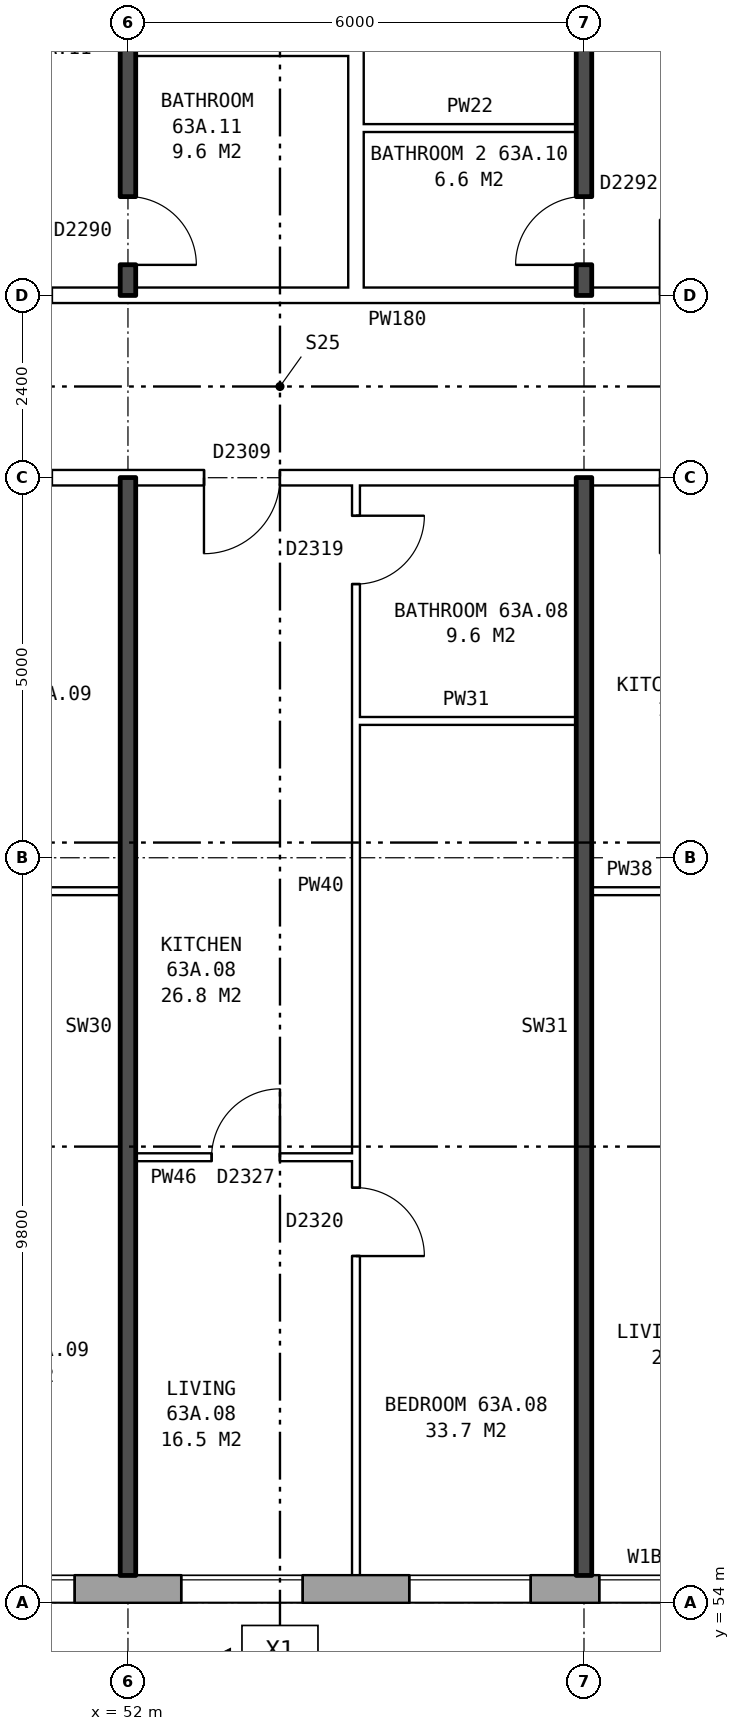
"""IFC4 building model, lengths in metres.
Left out: names, types, materials, properties, quantities, classifications, styles, units other than length and angle.
Written with IfcOpenShell. Run it as: python <this file> out.ifc"""

import sys

from ifc_helpers import new_model, si_unit, direction, frame, frame_2d, origin, place, context, subcontext, project, spatial, rectangle, extrude, element, fill, save


model = new_model("IFC4")
c1 = context("Model", 3, precision=1e-05, world=origin(), true_north=direction((0.0, 1.0)))
c2 = subcontext(c1, "Body", "Model", "MODEL_VIEW")
j1 = project(units=[si_unit("LENGTHUNIT", "METRE"), si_unit("PLANEANGLEUNIT", "RADIAN")], contexts=[c1])
p1 = place(None, origin())
s1 = spatial("IfcSite", under=j1, at=p1, CompositionType="ELEMENT")
p2 = place(p1, origin())
s2 = spatial("IfcBuilding", under=s1, at=p2, CompositionType="ELEMENT")
p3 = place(p2, frame((0.0, 0.0, 224.5)))
s3 = spatial("IfcBuildingStorey", under=s2, at=p3, CompositionType="ELEMENT", Elevation=224.5)
p4 = place(p3, frame((35.075, 54.18, 0.0), z_axis=(0.0, 0.0, 1.0), x_axis=(1.0, 0.0, 0.0)))
e1 = element("IfcWall", 1, at=p4, inside=s3, PredefinedType="STANDARD", context=c2, shape_type="SweptSolid", body=[
    extrude(rectangle(XDim=39.875, YDim=0.36, at=frame_2d((19.938, 0.0))), origin(), (0.0, 0.0, 1.0), 2.85),
])
p5 = place(p4, frame((2.625, 0.0, 0.8)))
e2 = element("IfcOpeningElement", 2, at=p5, cuts=e1, PredefinedType="OPENING", context=c2, shape_type="SweptSolid", body=[
    extrude(rectangle(XDim=1.6, YDim=1.8, at=frame_2d((0.8, 0.9))), frame((0.0, 0.19, 0.0), z_axis=(0.0, -1.0, 0.0), x_axis=(1.0, 0.0, 0.0)), (0.0, 0.0, 1.0), 0.38),
])
p6 = place(p4, frame((5.625, 0.0, 0.8)))
e3 = element("IfcOpeningElement", 3, at=p6, cuts=e1, PredefinedType="OPENING", context=c2, shape_type="SweptSolid", body=[
    extrude(rectangle(XDim=1.6, YDim=1.8, at=frame_2d((0.8, 0.9))), frame((0.0, 0.19, 0.0), z_axis=(0.0, -1.0, 0.0), x_axis=(1.0, 0.0, 0.0)), (0.0, 0.0, 1.0), 0.38),
])
p7 = place(p4, frame((8.625, 0.0, 0.8)))
e4 = element("IfcOpeningElement", 4, at=p7, cuts=e1, PredefinedType="OPENING", context=c2, shape_type="SweptSolid", body=[
    extrude(rectangle(XDim=1.6, YDim=1.8, at=frame_2d((0.8, 0.9))), frame((0.0, 0.19, 0.0), z_axis=(0.0, -1.0, 0.0), x_axis=(1.0, 0.0, 0.0)), (0.0, 0.0, 1.0), 0.38),
])
p8 = place(p4, frame((11.125, 0.0, 1.65)))
e5 = element("IfcOpeningElement", 5, at=p8, cuts=e1, PredefinedType="OPENING", context=c2, shape_type="SweptSolid", body=[
    extrude(rectangle(XDim=0.6, YDim=0.9, at=frame_2d((0.3, 0.45))), frame((0.0, 0.19, 0.0), z_axis=(0.0, -1.0, 0.0), x_axis=(1.0, 0.0, 0.0)), (0.0, 0.0, 1.0), 0.38),
])
p9 = place(p4, frame((14.625, 0.0, 0.8)))
e6 = element("IfcOpeningElement", 6, at=p9, cuts=e1, PredefinedType="OPENING", context=c2, shape_type="SweptSolid", body=[
    extrude(rectangle(XDim=1.6, YDim=1.8, at=frame_2d((0.8, 0.9))), frame((0.0, 0.19, 0.0), z_axis=(0.0, -1.0, 0.0), x_axis=(1.0, 0.0, 0.0)), (0.0, 0.0, 1.0), 0.38),
])
p10 = place(p4, frame((17.625, 0.0, 0.8)))
e7 = element("IfcOpeningElement", 7, at=p10, cuts=e1, PredefinedType="OPENING", context=c2, shape_type="SweptSolid", body=[
    extrude(rectangle(XDim=1.6, YDim=1.8, at=frame_2d((0.8, 0.9))), frame((0.0, 0.19, 0.0), z_axis=(0.0, -1.0, 0.0), x_axis=(1.0, 0.0, 0.0)), (0.0, 0.0, 1.0), 0.38),
])
p11 = place(p4, frame((20.625, 0.0, 0.8)))
e8 = element("IfcOpeningElement", 8, at=p11, cuts=e1, PredefinedType="OPENING", context=c2, shape_type="SweptSolid", body=[
    extrude(rectangle(XDim=1.6, YDim=1.8, at=frame_2d((0.8, 0.9))), frame((0.0, 0.19, 0.0), z_axis=(0.0, -1.0, 0.0), x_axis=(1.0, 0.0, 0.0)), (0.0, 0.0, 1.0), 0.38),
])
p12 = place(p4, frame((23.125, 0.0, 0.75)))
e9 = element("IfcOpeningElement", 9, at=p12, cuts=e1, PredefinedType="OPENING", context=c2, shape_type="SweptSolid", body=[
    extrude(rectangle(XDim=1.2, YDim=1.8, at=frame_2d((0.6, 0.9))), frame((0.0, 0.19, 0.0), z_axis=(0.0, -1.0, 0.0), x_axis=(1.0, 0.0, 0.0)), (0.0, 0.0, 1.0), 0.38),
])
p13 = place(p4, frame((26.625, 0.0, 0.8)))
e10 = element("IfcOpeningElement", 10, at=p13, cuts=e1, PredefinedType="OPENING", context=c2, shape_type="SweptSolid", body=[
    extrude(rectangle(XDim=1.6, YDim=1.8, at=frame_2d((0.8, 0.9))), frame((0.0, 0.19, 0.0), z_axis=(0.0, -1.0, 0.0), x_axis=(1.0, 0.0, 0.0)), (0.0, 0.0, 1.0), 0.38),
])
p14 = place(p4, frame((29.625, 0.0, 0.8)))
e11 = element("IfcOpeningElement", 11, at=p14, cuts=e1, PredefinedType="OPENING", context=c2, shape_type="SweptSolid", body=[
    extrude(rectangle(XDim=1.6, YDim=1.8, at=frame_2d((0.8, 0.9))), frame((0.0, 0.19, 0.0), z_axis=(0.0, -1.0, 0.0), x_axis=(1.0, 0.0, 0.0)), (0.0, 0.0, 1.0), 0.38),
])
p15 = place(p4, frame((32.625, 0.0, 0.8)))
e12 = element("IfcOpeningElement", 12, at=p15, cuts=e1, PredefinedType="OPENING", context=c2, shape_type="SweptSolid", body=[
    extrude(rectangle(XDim=1.6, YDim=1.8, at=frame_2d((0.8, 0.9))), frame((0.0, 0.19, 0.0), z_axis=(0.0, -1.0, 0.0), x_axis=(1.0, 0.0, 0.0)), (0.0, 0.0, 1.0), 0.38),
])
p16 = place(p4, frame((35.625, 0.0, 0.8)))
e13 = element("IfcOpeningElement", 13, at=p16, cuts=e1, PredefinedType="OPENING", context=c2, shape_type="SweptSolid", body=[
    extrude(rectangle(XDim=1.6, YDim=1.8, at=frame_2d((0.8, 0.9))), frame((0.0, 0.19, 0.0), z_axis=(0.0, -1.0, 0.0), x_axis=(1.0, 0.0, 0.0)), (0.0, 0.0, 1.0), 0.38),
])
p17 = place(p4, frame((12.925, 0.0, 0.15)))
e14 = element("IfcOpeningElement", 14, at=p17, cuts=e1, PredefinedType="OPENING", context=c2, shape_type="SweptSolid", body=[
    extrude(rectangle(XDim=0.8, YDim=1.5, at=frame_2d((0.4, 0.75))), frame((0.0, 0.19, 0.0), z_axis=(0.0, -1.0, 0.0), x_axis=(1.0, 0.0, 0.0)), (0.0, 0.0, 1.0), 0.38),
])
p18 = place(p4, frame((24.625, 0.0, 0.25)))
e15 = element("IfcOpeningElement", 15, at=p18, cuts=e1, PredefinedType="OPENING", context=c2, shape_type="SweptSolid", body=[
    extrude(rectangle(XDim=0.6, YDim=0.9, at=frame_2d((0.3, 0.45))), frame((0.0, 0.19, 0.0), z_axis=(0.0, -1.0, 0.0), x_axis=(1.0, 0.0, 0.0)), (0.0, 0.0, 1.0), 0.38),
])
p19 = place(p3, frame((52.1, 59.86, 0.0), z_axis=(0.0, 0.0, 1.0), x_axis=(1.0, 0.0, 0.0)))
e16 = element("IfcWall", 16, at=p19, inside=s3, PredefinedType="PARTITIONING", context=c2, shape_type="SweptSolid", body=[
    extrude(rectangle(XDim=2.9, YDim=0.1, at=frame_2d((1.45, 0.0))), origin(), (0.0, 0.0, 1.0), 2.85),
])
p20 = place(p19, frame((1.0, 0.0, 0.0)))
e17 = element("IfcOpeningElement", 17, at=p20, cuts=e16, PredefinedType="OPENING", context=c2, shape_type="SweptSolid", body=[
    extrude(rectangle(XDim=0.9, YDim=2.1, at=frame_2d((0.45, 1.05))), frame((0.0, 0.06, 0.0), z_axis=(0.0, -1.0, 0.0), x_axis=(1.0, 0.0, 0.0)), (0.0, 0.0, 1.0), 0.12),
])
p21 = place(p3, frame((49.0, 63.36, 0.0), z_axis=(0.0, 0.0, 1.0), x_axis=(1.0, 0.0, 0.0)))
e18 = element("IfcWall", 18, at=p21, inside=s3, PredefinedType="PARTITIONING", context=c2, shape_type="SweptSolid", body=[
    extrude(rectangle(XDim=2.9, YDim=0.1, at=frame_2d((1.45, 0.0))), origin(), (0.0, 0.0, 1.0), 2.85),
])
p22 = place(p21, frame((1.0, 0.0, 0.0)))
e19 = element("IfcOpeningElement", 19, at=p22, cuts=e18, PredefinedType="OPENING", context=c2, shape_type="SweptSolid", body=[
    extrude(rectangle(XDim=0.9, YDim=2.1, at=frame_2d((0.45, 1.05))), frame((0.0, 0.06, 0.0), z_axis=(0.0, -1.0, 0.0), x_axis=(1.0, 0.0, 0.0)), (0.0, 0.0, 1.0), 0.12),
])
p23 = place(p3, frame((58.1, 63.36, 0.0), z_axis=(0.0, 0.0, 1.0), x_axis=(1.0, 0.0, 0.0)))
e20 = element("IfcWall", 20, at=p23, inside=s3, PredefinedType="PARTITIONING", context=c2, shape_type="SweptSolid", body=[
    extrude(rectangle(XDim=2.9, YDim=0.1, at=frame_2d((1.45, 0.0))), origin(), (0.0, 0.0, 1.0), 2.85),
])
p24 = place(p23, frame((1.0, 0.0, 0.0)))
e21 = element("IfcOpeningElement", 21, at=p24, cuts=e20, PredefinedType="OPENING", context=c2, shape_type="SweptSolid", body=[
    extrude(rectangle(XDim=0.9, YDim=2.1, at=frame_2d((0.45, 1.05))), frame((0.0, 0.06, 0.0), z_axis=(0.0, -1.0, 0.0), x_axis=(1.0, 0.0, 0.0)), (0.0, 0.0, 1.0), 0.12),
])
p25 = place(p3, frame((55.0, 65.6, 0.0), z_axis=(0.0, 0.0, 1.0), x_axis=(1.0, 0.0, 0.0)))
e22 = element("IfcWall", 22, at=p25, inside=s3, PredefinedType="PARTITIONING", context=c2, shape_type="SweptSolid", body=[
    extrude(rectangle(XDim=2.9, YDim=0.1, at=frame_2d((1.45, 0.0))), origin(), (0.0, 0.0, 1.0), 2.85),
])
p26 = place(p3, frame((44.36, 68.8, 0.0), z_axis=(0.0, 0.0, 1.0), x_axis=(1.0, 0.0, 0.0)))
e23 = element("IfcWall", 23, at=p26, inside=s3, PredefinedType="PARTITIONING", context=c2, shape_type="SweptSolid", body=[
    extrude(rectangle(XDim=19.28, YDim=0.2, at=frame_2d((9.64, 0.0))), origin(), (0.0, 0.0, 1.0), 2.85),
])
p27 = place(p26, frame((14.64, 0.0, 0.0)))
e24 = element("IfcOpeningElement", 24, at=p27, cuts=e23, PredefinedType="OPENING", context=c2, shape_type="SweptSolid", body=[
    extrude(rectangle(XDim=1.0, YDim=2.1, at=frame_2d((0.5, 1.05))), frame((0.0, 0.11, 0.0), z_axis=(0.0, -1.0, 0.0), x_axis=(1.0, 0.0, 0.0)), (0.0, 0.0, 1.0), 0.22),
])
p28 = place(p26, frame((8.64, 0.0, 0.0)))
e25 = element("IfcOpeningElement", 25, at=p28, cuts=e23, PredefinedType="OPENING", context=c2, shape_type="SweptSolid", body=[
    extrude(rectangle(XDim=1.0, YDim=2.1, at=frame_2d((0.5, 1.05))), frame((0.0, 0.11, 0.0), z_axis=(0.0, -1.0, 0.0), x_axis=(1.0, 0.0, 0.0)), (0.0, 0.0, 1.0), 0.22),
])
p29 = place(p26, frame((5.64, 0.0, 0.0)))
e26 = element("IfcOpeningElement", 26, at=p29, cuts=e23, PredefinedType="OPENING", context=c2, shape_type="SweptSolid", body=[
    extrude(rectangle(XDim=1.0, YDim=2.1, at=frame_2d((0.5, 1.05))), frame((0.0, 0.11, 0.0), z_axis=(0.0, -1.0, 0.0), x_axis=(1.0, 0.0, 0.0)), (0.0, 0.0, 1.0), 0.22),
])
p30 = place(p3, frame((44.36, 71.2, 0.0), z_axis=(0.0, 0.0, 1.0), x_axis=(1.0, 0.0, 0.0)))
e27 = element("IfcWall", 27, at=p30, inside=s3, PredefinedType="PARTITIONING", context=c2, shape_type="SweptSolid", body=[
    extrude(rectangle(XDim=19.28, YDim=0.2, at=frame_2d((9.64, 0.0))), origin(), (0.0, 0.0, 1.0), 2.85),
])
p31 = place(p30, frame((14.64, 0.0, 0.0)))
e28 = element("IfcOpeningElement", 28, at=p31, cuts=e27, PredefinedType="OPENING", context=c2, shape_type="SweptSolid", body=[
    extrude(rectangle(XDim=1.0, YDim=2.1, at=frame_2d((0.5, 1.05))), frame((0.0, 0.11, 0.0), z_axis=(0.0, -1.0, 0.0), x_axis=(1.0, 0.0, 0.0)), (0.0, 0.0, 1.0), 0.22),
])
p32 = place(p30, frame((5.64, 0.0, 0.0)))
e29 = element("IfcOpeningElement", 29, at=p32, cuts=e27, PredefinedType="OPENING", context=c2, shape_type="SweptSolid", body=[
    extrude(rectangle(XDim=1.0, YDim=2.1, at=frame_2d((0.5, 1.05))), frame((0.0, 0.11, 0.0), z_axis=(0.0, -1.0, 0.0), x_axis=(1.0, 0.0, 0.0)), (0.0, 0.0, 1.0), 0.22),
])
for number, where, z_axis, x_axis in (
    (30, (55.1, 73.4, 0.0), (0.0, 0.0, 1.0), (1.0, 0.0, 0.0)),
    (31, (52.1, 74.4, 0.0), (0.0, 0.0, 1.0), (1.0, 0.0, 0.0)),
):
    element("IfcWall", number, at=place(p3, frame(where, z_axis=z_axis, x_axis=x_axis)), inside=s3, PredefinedType="PARTITIONING", context=c2, shape_type="SweptSolid", body=[
        extrude(rectangle(XDim=2.8, YDim=0.1, at=frame_2d((1.4, 0.0))), origin(), (0.0, 0.0, 1.0), 2.85),
    ])
p33 = place(p3, frame((52.0, 54.36, 0.0), z_axis=(0.0, 0.0, 1.0), x_axis=(0.0, 1.0, 0.0)))
e32 = element("IfcWall", 32, at=p33, inside=s3, PredefinedType="SOLIDWALL", context=c2, shape_type="SweptSolid", body=[
    extrude(rectangle(XDim=14.44, YDim=0.2, at=frame_2d((7.22, 0.0))), origin(), (0.0, 0.0, 1.0), 2.85),
])
p34 = place(p3, frame((52.0, 71.2, 0.0), z_axis=(0.0, 0.0, 1.0), x_axis=(0.0, 1.0, 0.0)))
e33 = element("IfcWall", 33, at=p34, inside=s3, PredefinedType="SOLIDWALL", context=c2, shape_type="SweptSolid", body=[
    extrude(rectangle(XDim=14.44, YDim=0.2, at=frame_2d((7.22, 0.0))), origin(), (0.0, 0.0, 1.0), 2.85),
])
p35 = place(p34, frame((5.84, 0.0, 0.0)))
e34 = element("IfcOpeningElement", 34, at=p35, cuts=e33, PredefinedType="OPENING", context=c2, shape_type="SweptSolid", body=[
    extrude(rectangle(XDim=0.9, YDim=2.1, at=frame_2d((0.45, 1.05))), frame((0.0, 0.11, 0.0), z_axis=(0.0, -1.0, 0.0), x_axis=(1.0, 0.0, 0.0)), (0.0, 0.0, 1.0), 0.22),
])
p36 = place(p34, frame((0.4, 0.0, 0.0)))
e35 = element("IfcOpeningElement", 35, at=p36, cuts=e33, PredefinedType="OPENING", context=c2, shape_type="SweptSolid", body=[
    extrude(rectangle(XDim=0.9, YDim=2.1, at=frame_2d((0.45, 1.05))), frame((0.0, 0.11, 0.0), z_axis=(0.0, -1.0, 0.0), x_axis=(1.0, 0.0, 0.0)), (0.0, 0.0, 1.0), 0.22),
])
p37 = place(p3, frame((55.0, 54.36, 0.0), z_axis=(0.0, 0.0, 1.0), x_axis=(0.0, 1.0, 0.0)))
e36 = element("IfcWall", 36, at=p37, inside=s3, PredefinedType="PARTITIONING", context=c2, shape_type="SweptSolid", body=[
    extrude(rectangle(XDim=14.34, YDim=0.1, at=frame_2d((7.17, 0.0))), origin(), (0.0, 0.0, 1.0), 2.85),
])
p38 = place(p37, frame((4.2, 0.0, 0.0)))
e37 = element("IfcOpeningElement", 37, at=p38, cuts=e36, PredefinedType="OPENING", context=c2, shape_type="SweptSolid", body=[
    extrude(rectangle(XDim=0.9, YDim=2.1, at=frame_2d((0.45, 1.05))), frame((0.0, 0.06, 0.0), z_axis=(0.0, -1.0, 0.0), x_axis=(1.0, 0.0, 0.0)), (0.0, 0.0, 1.0), 0.12),
])
p39 = place(p37, frame((13.04, 0.0, 0.0)))
e38 = element("IfcOpeningElement", 38, at=p39, cuts=e36, PredefinedType="OPENING", context=c2, shape_type="SweptSolid", body=[
    extrude(rectangle(XDim=0.9, YDim=2.1, at=frame_2d((0.45, 1.05))), frame((0.0, 0.06, 0.0), z_axis=(0.0, -1.0, 0.0), x_axis=(1.0, 0.0, 0.0)), (0.0, 0.0, 1.0), 0.12),
])
p40 = place(p3, frame((55.0, 71.3, 0.0), z_axis=(0.0, 0.0, 1.0), x_axis=(0.0, 1.0, 0.0)))
e39 = element("IfcWall", 39, at=p40, inside=s3, PredefinedType="PARTITIONING", context=c2, shape_type="SweptSolid", body=[
    extrude(rectangle(XDim=14.34, YDim=0.2, at=frame_2d((7.17, 0.0))), origin(), (0.0, 0.0, 1.0), 2.85),
])
p41 = place(p3, frame((58.0, 54.36, 0.0), z_axis=(0.0, 0.0, 1.0), x_axis=(0.0, 1.0, 0.0)))
e40 = element("IfcWall", 40, at=p41, inside=s3, PredefinedType="SOLIDWALL", context=c2, shape_type="SweptSolid", body=[
    extrude(rectangle(XDim=14.44, YDim=0.2, at=frame_2d((7.22, 0.0))), origin(), (0.0, 0.0, 1.0), 2.85),
])
p42 = place(p3, frame((58.0, 71.2, 0.0), z_axis=(0.0, 0.0, 1.0), x_axis=(0.0, 1.0, 0.0)))
e41 = element("IfcWall", 41, at=p42, inside=s3, PredefinedType="SOLIDWALL", context=c2, shape_type="SweptSolid", body=[
    extrude(rectangle(XDim=14.44, YDim=0.2, at=frame_2d((7.22, 0.0))), origin(), (0.0, 0.0, 1.0), 2.85),
])
p43 = place(p42, frame((8.04, 0.0, 0.0)))
e42 = element("IfcOpeningElement", 42, at=p43, cuts=e41, PredefinedType="OPENING", context=c2, shape_type="SweptSolid", body=[
    extrude(rectangle(XDim=0.9, YDim=2.1, at=frame_2d((0.45, 1.05))), frame((0.0, 0.11, 0.0), z_axis=(0.0, -1.0, 0.0), x_axis=(1.0, 0.0, 0.0)), (0.0, 0.0, 1.0), 0.22),
])
p44 = place(p42, frame((0.4, 0.0, 0.0)))
e43 = element("IfcOpeningElement", 43, at=p44, cuts=e41, PredefinedType="OPENING", context=c2, shape_type="SweptSolid", body=[
    extrude(rectangle(XDim=0.9, YDim=2.1, at=frame_2d((0.45, 1.05))), frame((0.0, 0.11, 0.0), z_axis=(0.0, -1.0, 0.0), x_axis=(1.0, 0.0, 0.0)), (0.0, 0.0, 1.0), 0.22),
])
p45 = place(p9, origin())
e44 = element("IfcWindow", 44, at=p45, inside=s3, PartitioningType="SINGLE_PANEL", PredefinedType="WINDOW", context=c2, shape_type="SweptSolid", body=[
    extrude(rectangle(XDim=1.6, YDim=1.8, at=frame_2d((0.8, 0.9))), frame((0.0, 0.15, 0.0), z_axis=(0.0, -1.0, 0.0), x_axis=(1.0, 0.0, 0.0)), (0.0, 0.0, 1.0), 0.06),
])
fill(e6, e44)
p46 = place(p10, origin())
e45 = element("IfcWindow", 45, at=p46, inside=s3, PartitioningType="SINGLE_PANEL", PredefinedType="WINDOW", context=c2, shape_type="SweptSolid", body=[
    extrude(rectangle(XDim=1.6, YDim=1.8, at=frame_2d((0.8, 0.9))), frame((0.0, 0.15, 0.0), z_axis=(0.0, -1.0, 0.0), x_axis=(1.0, 0.0, 0.0)), (0.0, 0.0, 1.0), 0.06),
])
fill(e7, e45)
p47 = place(p11, origin())
e46 = element("IfcWindow", 46, at=p47, inside=s3, PartitioningType="SINGLE_PANEL", PredefinedType="WINDOW", context=c2, shape_type="SweptSolid", body=[
    extrude(rectangle(XDim=1.6, YDim=1.8, at=frame_2d((0.8, 0.9))), frame((0.0, 0.15, 0.0), z_axis=(0.0, -1.0, 0.0), x_axis=(1.0, 0.0, 0.0)), (0.0, 0.0, 1.0), 0.06),
])
fill(e8, e46)
p48 = place(p12, origin())
e47 = element("IfcWindow", 47, at=p48, inside=s3, PartitioningType="SINGLE_PANEL", PredefinedType="WINDOW", context=c2, shape_type="SweptSolid", body=[
    extrude(rectangle(XDim=1.2, YDim=1.8, at=frame_2d((0.6, 0.9))), frame((0.0, 0.15, 0.0), z_axis=(0.0, -1.0, 0.0), x_axis=(1.0, 0.0, 0.0)), (0.0, 0.0, 1.0), 0.06),
])
fill(e9, e47)
p49 = place(p38, frame((0.9, 0.0, 0.0), z_axis=(0.0, 0.0, 1.0), x_axis=(-1.0, 0.0, 0.0)))
e48 = element("IfcDoor", 48, at=p49, inside=s3, OperationType="SINGLE_SWING_RIGHT", PredefinedType="DOOR", context=c2, shape_type="SweptSolid", body=[
    extrude(rectangle(XDim=0.9, YDim=2.1, at=frame_2d((0.45, 1.05))), frame((0.0, 0.025, 0.0), z_axis=(0.0, -1.0, 0.0), x_axis=(1.0, 0.0, 0.0)), (0.0, 0.0, 1.0), 0.05),
])
fill(e37, e48)
p50 = place(p28, frame((1.0, 0.0, 0.0), z_axis=(0.0, 0.0, 1.0), x_axis=(-1.0, 0.0, 0.0)))
e49 = element("IfcDoor", 49, at=p50, inside=s3, OperationType="SINGLE_SWING_RIGHT", PredefinedType="DOOR", context=c2, shape_type="SweptSolid", body=[
    extrude(rectangle(XDim=1.0, YDim=2.1, at=frame_2d((0.5, 1.05))), frame((0.0, 0.025, 0.0), z_axis=(0.0, -1.0, 0.0), x_axis=(1.0, 0.0, 0.0)), (0.0, 0.0, 1.0), 0.05),
])
fill(e25, e49)
p51 = place(p20, origin())
e50 = element("IfcDoor", 50, at=p51, inside=s3, OperationType="SINGLE_SWING_RIGHT", PredefinedType="DOOR", context=c2, shape_type="SweptSolid", body=[
    extrude(rectangle(XDim=0.9, YDim=2.1, at=frame_2d((0.45, 1.05))), frame((0.0, 0.025, 0.0), z_axis=(0.0, -1.0, 0.0), x_axis=(1.0, 0.0, 0.0)), (0.0, 0.0, 1.0), 0.05),
])
fill(e17, e50)
p52 = place(p39, frame((0.9, 0.0, 0.0), z_axis=(0.0, 0.0, 1.0), x_axis=(-1.0, 0.0, 0.0)))
e51 = element("IfcDoor", 51, at=p52, inside=s3, OperationType="SINGLE_SWING_LEFT", PredefinedType="DOOR", context=c2, shape_type="SweptSolid", body=[
    extrude(rectangle(XDim=0.9, YDim=2.1, at=frame_2d((0.45, 1.05))), frame((0.0, 0.025, 0.0), z_axis=(0.0, -1.0, 0.0), x_axis=(1.0, 0.0, 0.0)), (0.0, 0.0, 1.0), 0.05),
])
fill(e38, e51)
p53 = place(p44, origin())
e52 = element("IfcDoor", 52, at=p53, inside=s3, OperationType="SINGLE_SWING_LEFT", PredefinedType="DOOR", context=c2, shape_type="SweptSolid", body=[
    extrude(rectangle(XDim=0.9, YDim=2.1, at=frame_2d((0.45, 1.05))), frame((0.0, 0.025, 0.0), z_axis=(0.0, -1.0, 0.0), x_axis=(1.0, 0.0, 0.0)), (0.0, 0.0, 1.0), 0.05),
])
fill(e43, e52)
p54 = place(p36, frame((0.9, 0.0, 0.0), z_axis=(0.0, 0.0, 1.0), x_axis=(-1.0, 0.0, 0.0)))
e53 = element("IfcDoor", 53, at=p54, inside=s3, OperationType="SINGLE_SWING_RIGHT", PredefinedType="DOOR", context=c2, shape_type="SweptSolid", body=[
    extrude(rectangle(XDim=0.9, YDim=2.1, at=frame_2d((0.45, 1.05))), frame((0.0, 0.025, 0.0), z_axis=(0.0, -1.0, 0.0), x_axis=(1.0, 0.0, 0.0)), (0.0, 0.0, 1.0), 0.05),
])
fill(e35, e53)
save(model, sys.argv[1])
